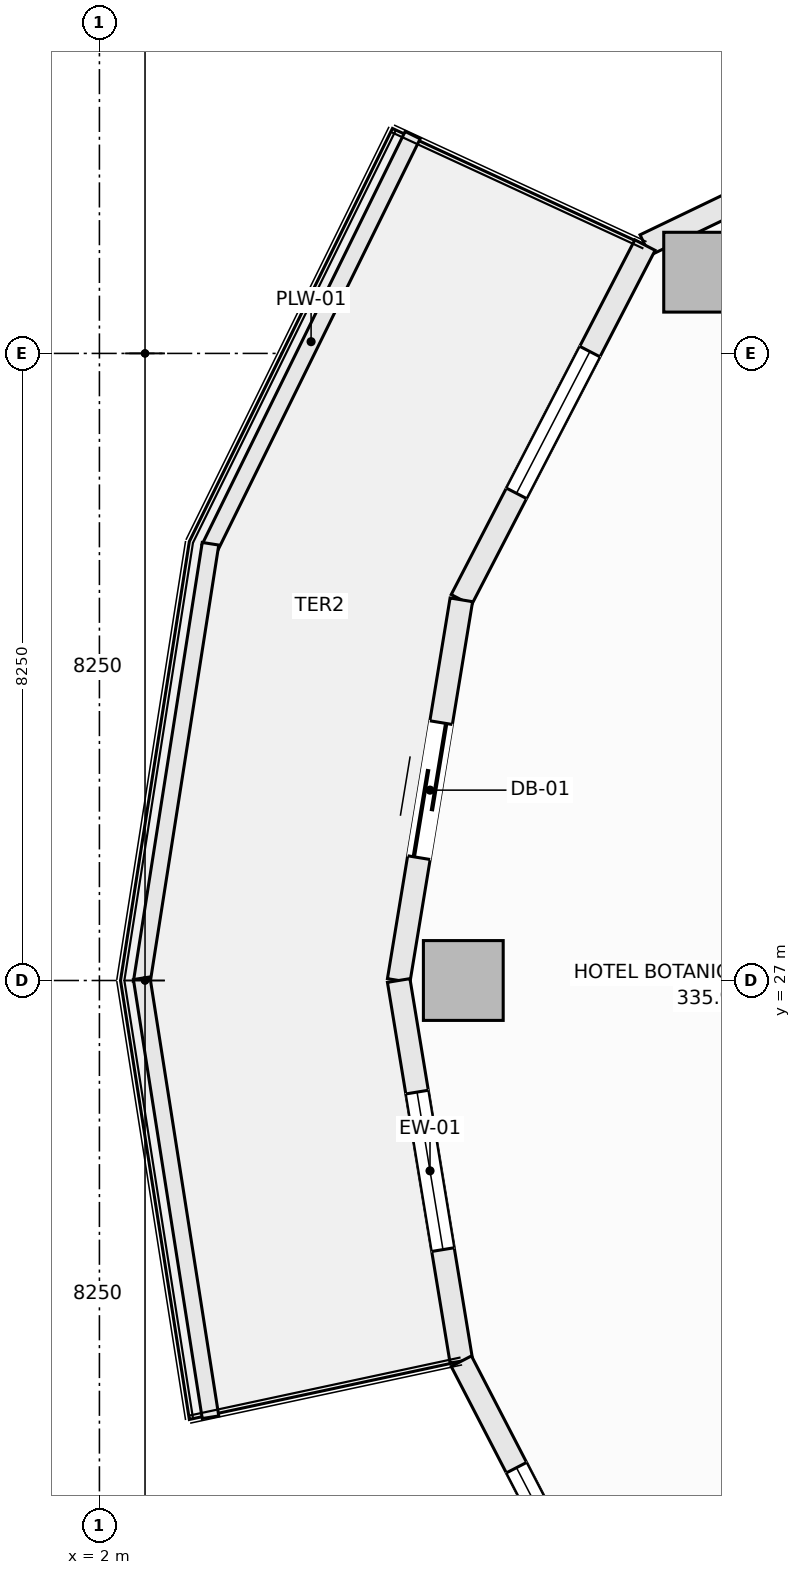
"""IFC4 building model, lengths in metres.
Left out: names, types, materials, properties, quantities, classifications, styles, units other than length and angle.
Written with IfcOpenShell. Run it as: python <this file> out.ifc"""

import sys

from ifc_helpers import new_model, si_unit, direction, frame, frame_2d, origin, origin_2d, place, context, subcontext, project, spatial, rectangle, extrude, element, fill, save


model = new_model("IFC4")
c1 = context("Model", 3, precision=1e-05, world=origin(), true_north=direction((0.0, 1.0)))
c2 = subcontext(c1, "Body", "Model", "MODEL_VIEW")
j1 = project(units=[si_unit("LENGTHUNIT", "METRE"), si_unit("PLANEANGLEUNIT", "RADIAN")], contexts=[c1])
p1 = place(None, origin())
s1 = spatial("IfcSite", under=j1, at=p1, CompositionType="ELEMENT")
p2 = place(p1, origin())
s2 = spatial("IfcBuilding", under=s1, at=p2, CompositionType="ELEMENT")
p3 = place(p2, frame((0.0, 0.0, 105.3)))
s3 = spatial("IfcBuildingStorey", under=s2, at=p3, CompositionType="ELEMENT", Elevation=105.3)
for number, where, z_axis, x_axis in (
    (1, (9.95, 36.319, -0.27), (0.0, 0.0, 1.0), (1.0, 0.0, 0.0)),
    (2, (6.788, 27.0, -0.27), (0.0, 0.0, 1.0), (1.0, 0.0, 0.0)),
):
    element("IfcColumn", number, at=place(p3, frame(where, z_axis=z_axis, x_axis=x_axis)), inside=s3, PredefinedType="COLUMN", context=c2, shape_type="SweptSolid", body=[
        extrude(rectangle(XDim=1.05, YDim=1.05, at=origin_2d()), origin(), (0.0, 0.0, 1.0), 3.4),
    ])
p4 = place(p3, frame((9.178, 36.675, 0.0), z_axis=(0.0, 0.0, 1.0), x_axis=(0.901370184739, 0.433049408339, 0.0)))
e3 = element("IfcWall", 3, at=p4, inside=s3, PredefinedType="SOLIDWALL", context=c2, shape_type="SweptSolid", body=[
    extrude(rectangle(XDim=5.884, YDim=0.3, at=frame_2d((2.942, 0.0))), origin(), (0.0, 0.0, 1.0), 2.653),
])
p5 = place(p4, frame((1.892, 0.0, 0.74)))
e4 = element("IfcOpeningElement", 4, at=p5, cuts=e3, PredefinedType="OPENING", context=c2, shape_type="SweptSolid", body=[
    extrude(rectangle(XDim=2.1, YDim=1.7, at=frame_2d((1.05, 0.85))), frame((0.0, 0.16, 0.0), z_axis=(0.0, -1.0, 0.0), x_axis=(1.0, 0.0, 0.0)), (0.0, 0.0, 1.0), 0.32),
])
p6 = place(p3, frame((6.762, 32.008, 0.0), z_axis=(0.0, 0.0, 1.0), x_axis=(0.459767899643, 0.888039119892, 0.0)))
e5 = element("IfcWall", 5, at=p6, inside=s3, PredefinedType="SOLIDWALL", context=c2, shape_type="SweptSolid", body=[
    extrude(rectangle(XDim=5.255, YDim=0.3, at=frame_2d((2.628, 0.0))), origin(), (0.0, 0.0, 1.0), 2.653),
])
p7 = place(p6, frame((1.578, 0.0, 0.74)))
e6 = element("IfcOpeningElement", 6, at=p7, cuts=e5, PredefinedType="OPENING", context=c2, shape_type="SweptSolid", body=[
    extrude(rectangle(XDim=2.1, YDim=1.7, at=frame_2d((1.05, 0.85))), frame((0.0, 0.16, 0.0), z_axis=(0.0, -1.0, 0.0), x_axis=(1.0, 0.0, 0.0)), (0.0, 0.0, 1.0), 0.32),
])
p8 = place(p3, frame((5.938, 27.0, 0.0), z_axis=(0.0, 0.0, 1.0), x_axis=(0.162393944769, 0.986726003864, 0.0)))
e7 = element("IfcWall", 7, at=p8, inside=s3, PredefinedType="SOLIDWALL", context=c2, shape_type="SweptSolid", body=[
    extrude(rectangle(XDim=5.075, YDim=0.3, at=frame_2d((2.538, 0.0))), origin(), (0.0, 0.0, 1.0), 2.653),
])
p9 = place(p8, frame((1.638, 0.0, 0.0)))
e8 = element("IfcOpeningElement", 8, at=p9, cuts=e7, PredefinedType="OPENING", context=c2, shape_type="SweptSolid", body=[
    extrude(rectangle(XDim=1.8, YDim=2.25, at=frame_2d((0.9, 1.125))), frame((0.0, 0.16, 0.0), z_axis=(0.0, -1.0, 0.0), x_axis=(1.0, 0.0, 0.0)), (0.0, 0.0, 1.0), 0.32),
])
p10 = place(p3, frame((5.938, 27.0, 0.0), z_axis=(0.0, 0.0, 1.0), x_axis=(0.162393944769, -0.986726003864, 0.0)))
e9 = element("IfcWall", 9, at=p10, inside=s3, PredefinedType="SOLIDWALL", context=c2, shape_type="SweptSolid", body=[
    extrude(rectangle(XDim=5.075, YDim=0.3, at=frame_2d((2.538, 0.0))), origin(), (0.0, 0.0, 1.0), 2.653),
])
p11 = place(p10, frame((1.488, 0.0, 0.74)))
e10 = element("IfcOpeningElement", 10, at=p11, cuts=e9, PredefinedType="OPENING", context=c2, shape_type="SweptSolid", body=[
    extrude(rectangle(XDim=2.1, YDim=1.7, at=frame_2d((1.05, 0.85))), frame((0.0, 0.16, 0.0), z_axis=(0.0, -1.0, 0.0), x_axis=(1.0, 0.0, 0.0)), (0.0, 0.0, 1.0), 0.32),
])
p12 = place(p3, frame((6.762, 21.992, 0.0), z_axis=(0.0, 0.0, 1.0), x_axis=(0.459767899643, -0.888039119892, 0.0)))
e11 = element("IfcWall", 11, at=p12, inside=s3, PredefinedType="SOLIDWALL", context=c2, shape_type="SweptSolid", body=[
    extrude(rectangle(XDim=5.255, YDim=0.3, at=frame_2d((2.628, 0.0))), origin(), (0.0, 0.0, 1.0), 2.653),
])
p13 = place(p12, frame((1.578, 0.0, 0.74)))
e12 = element("IfcOpeningElement", 12, at=p13, cuts=e11, PredefinedType="OPENING", context=c2, shape_type="SweptSolid", body=[
    extrude(rectangle(XDim=2.1, YDim=1.7, at=frame_2d((1.05, 0.85))), frame((0.0, 0.16, 0.0), z_axis=(0.0, -1.0, 0.0), x_axis=(1.0, 0.0, 0.0)), (0.0, 0.0, 1.0), 0.32),
])
p14 = place(p3, frame((3.449, 32.687, 0.0), z_axis=(0.0, 0.0, 1.0), x_axis=(0.441269631716, 0.897374566235, 0.0)))
e13 = element("IfcWall", 13, at=p14, inside=s3, PredefinedType="PARAPET", context=c2, shape_type="SweptSolid", body=[
    extrude(rectangle(XDim=6.056, YDim=0.22, at=frame_2d((3.028, 0.0))), origin(), (0.0, 0.0, 1.0), 0.52),
])
for number, where, z_axis, x_axis in (
    (14, (2.556, 26.971, 0.0), (0.0, 0.0, 1.0), (0.155, 0.988, 0.0)),
    (15, (2.556, 27.029, 0.0), (0.0, 0.0, 1.0), (0.155, -0.988, 0.0)),
):
    element("IfcWall", number, at=place(p3, frame(where, z_axis=z_axis, x_axis=x_axis)), inside=s3, PredefinedType="PARAPET", context=c2, shape_type="SweptSolid", body=[
        extrude(rectangle(XDim=5.846, YDim=0.22, at=frame_2d((2.923, 0.0))), origin(), (0.0, 0.0, 1.0), 0.52),
    ])
p15 = place(p7, origin())
e16 = element("IfcWindow", 16, at=p15, inside=s3, PartitioningType="SINGLE_PANEL", PredefinedType="WINDOW", context=c2, shape_type="SweptSolid", body=[
    extrude(rectangle(XDim=2.1, YDim=1.7, at=frame_2d((1.05, 0.85))), frame((0.0, 0.03, 0.0), z_axis=(0.0, -1.0, 0.0), x_axis=(1.0, 0.0, 0.0)), (0.0, 0.0, 1.0), 0.06),
])
fill(e6, e16)
p16 = place(p9, origin())
e17 = element("IfcDoor", 17, at=p16, inside=s3, OperationType="SLIDING_TO_LEFT", PredefinedType="DOOR", context=c2, shape_type="SweptSolid", body=[
    extrude(rectangle(XDim=1.8, YDim=2.25, at=frame_2d((0.9, 1.125))), frame((0.0, 0.025, 0.0), z_axis=(0.0, -1.0, 0.0), x_axis=(1.0, 0.0, 0.0)), (0.0, 0.0, 1.0), 0.05),
])
fill(e8, e17)
p17 = place(p11, origin())
e18 = element("IfcWindow", 18, at=p17, inside=s3, PartitioningType="SINGLE_PANEL", PredefinedType="WINDOW", context=c2, shape_type="SweptSolid", body=[
    extrude(rectangle(XDim=2.1, YDim=1.7, at=frame_2d((1.05, 0.85))), frame((0.0, 0.03, 0.0), z_axis=(0.0, -1.0, 0.0), x_axis=(1.0, 0.0, 0.0)), (0.0, 0.0, 1.0), 0.06),
])
fill(e10, e18)
p18 = place(p13, origin())
e19 = element("IfcWindow", 19, at=p18, inside=s3, PartitioningType="SINGLE_PANEL", PredefinedType="WINDOW", context=c2, shape_type="SweptSolid", body=[
    extrude(rectangle(XDim=2.1, YDim=1.7, at=frame_2d((1.05, 0.85))), frame((0.0, 0.03, 0.0), z_axis=(0.0, -1.0, 0.0), x_axis=(1.0, 0.0, 0.0)), (0.0, 0.0, 1.0), 0.06),
])
fill(e12, e19)
save(model, sys.argv[1])
